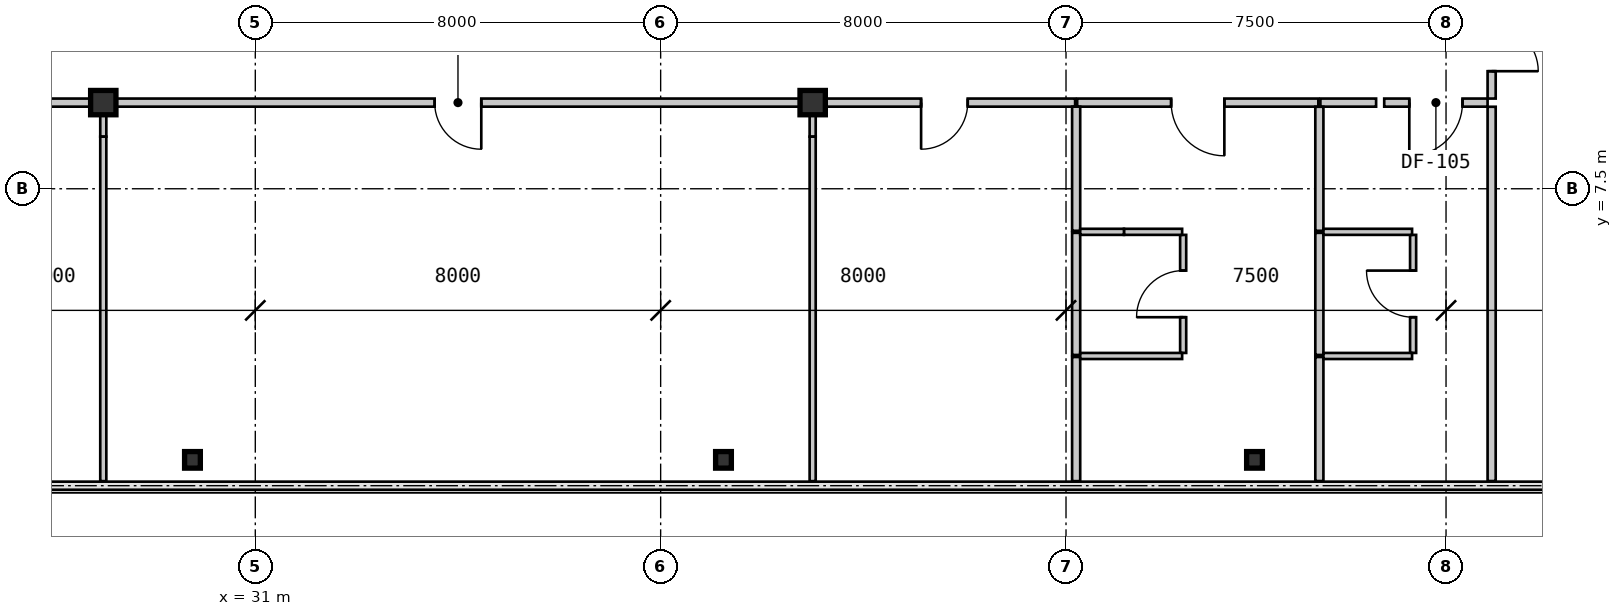
"""IFC4 building model, lengths in metres.
Left out: names, types, materials, properties, quantities, classifications, styles, units other than length and angle.
Written with IfcOpenShell. Run it as: python <this file> out.ifc"""

import sys

from ifc_helpers import new_model, si_unit, direction, frame, frame_2d, origin, origin_2d, place, context, subcontext, project, spatial, rectangle, i_section, extrude, source, transform, mapped, element, fill, save


model = new_model("IFC4")
c1 = context("Model", 3, precision=1e-05, world=origin(), true_north=direction((0.0, 1.0)))
c2 = subcontext(c1, "Body", "Model", "MODEL_VIEW")
j1 = project(units=[si_unit("LENGTHUNIT", "METRE"), si_unit("PLANEANGLEUNIT", "RADIAN")], contexts=[c1])
p1 = place(None, origin())
s1 = spatial("IfcSite", under=j1, at=p1, CompositionType="ELEMENT")
p2 = place(p1, origin())
s2 = spatial("IfcBuilding", under=s1, at=p2, CompositionType="ELEMENT")
p3 = place(p2, frame((0.0, 0.0, 26.25)))
s3 = spatial("IfcBuildingStorey", under=s2, at=p3, CompositionType="ELEMENT", Elevation=26.25)
m1 = source(origin(), c2, "Body", "SweptSolid", [
    extrude(i_section(OverallWidth=0.5, OverallDepth=0.48, WebThickness=0.028, FlangeThickness=0.044, at=origin_2d()), origin(), (0.0, 0.0, 1.0), 3.15),
])
for number, where, z_axis, x_axis in (
    (1, (28.0, 9.2, 0.0), (0.0, 0.0, 1.0), (1.0, 0.0, 0.0)),
    (2, (42.0, 9.2, 0.0), (0.0, 0.0, 1.0), (1.0, 0.0, 0.0)),
):
    element("IfcColumn", number, at=place(p3, frame(where, z_axis=z_axis, x_axis=x_axis)), inside=s3, PredefinedType="COLUMN", context=c2, shape_type="MappedRepresentation", body=[
        mapped(m1, transform((0.0, 0.0, 0.0), scale=1.0)),
    ])
m2 = source(origin(), c2, "Body", "SweptSolid", [
    extrude(i_section(OverallWidth=0.311, OverallDepth=0.327, WebThickness=0.016, FlangeThickness=0.025, at=origin_2d()), origin(), (0.0, 0.0, 1.0), 3.15),
])
for number, where, z_axis, x_axis in (
    (3, (29.76, 2.15, 0.0), (0.0, 0.0, 1.0), (1.0, 0.0, 0.0)),
    (4, (40.24, 2.15, 0.0), (0.0, 0.0, 1.0), (1.0, 0.0, 0.0)),
    (5, (50.72, 2.15, 0.0), (0.0, 0.0, 1.0), (1.0, 0.0, 0.0)),
):
    element("IfcColumn", number, at=place(p3, frame(where, z_axis=z_axis, x_axis=x_axis)), inside=s3, PredefinedType="COLUMN", context=c2, shape_type="MappedRepresentation", body=[
        mapped(m2, transform((0.0, 0.0, 0.0), scale=1.0)),
    ])
m3 = source(origin(), c2, "Body", "SweptSolid", [
    extrude(rectangle(XDim=2.04, YDim=0.16, at=frame_2d((1.02, 0.0))), origin(), (0.0, 0.0, 1.0), 2.93),
])
p4 = place(p3, frame((55.32, 9.2, 0.0), z_axis=(0.0, 0.0, 1.0), x_axis=(-1.0, 0.0, 0.0)))
e6 = element("IfcWall", 6, at=p4, inside=s3, PredefinedType="PARTITIONING", context=c2, shape_type="MappedRepresentation", body=[
    mapped(m3, transform((0.0, 0.0, 0.0), scale=1.0)),
])
m4 = source(origin(), c2, "Body", "SweptSolid", [
    extrude(rectangle(XDim=1.05, YDim=2.1, at=frame_2d((0.525, 1.05))), frame((0.0, 0.09, 0.0), z_axis=(0.0, -1.0, 0.0), x_axis=(1.0, 0.0, 0.0)), (0.0, 0.0, 1.0), 0.18),
])
p5 = place(p4, frame((0.495, 0.0, 0.0)))
e7 = element("IfcOpeningElement", 7, at=p5, cuts=e6, PredefinedType="OPENING", context=c2, shape_type="MappedRepresentation", body=[
    mapped(m4, transform((0.0, 0.0, 0.0), scale=1.0)),
])
m5 = source(origin(), c2, "Body", "SweptSolid", [
    extrude(rectangle(XDim=2.0, YDim=0.16, at=frame_2d((1.0, 0.0))), origin(), (0.0, 0.0, 1.0), 2.93),
])
p6 = place(p3, frame((55.4, 11.28, 0.0), z_axis=(0.0, 0.0, 1.0), x_axis=(0.0, -1.0, 0.0)))
e8 = element("IfcWall", 8, at=p6, inside=s3, PredefinedType="PARTITIONING", context=c2, shape_type="MappedRepresentation", body=[
    mapped(m5, transform((0.0, 0.0, 0.0), scale=1.0)),
])
m6 = source(origin(), c2, "Body", "SweptSolid", [
    extrude(rectangle(XDim=0.92, YDim=2.1, at=frame_2d((0.46, 1.05))), frame((0.0, 0.09, 0.0), z_axis=(0.0, -1.0, 0.0), x_axis=(1.0, 0.0, 0.0)), (0.0, 0.0, 1.0), 0.18),
])
p7 = place(p6, frame((0.54, 0.0, 0.0)))
e9 = element("IfcOpeningElement", 9, at=p7, cuts=e8, PredefinedType="OPENING", context=c2, shape_type="MappedRepresentation", body=[
    mapped(m6, transform((0.0, 0.0, 0.0), scale=1.0)),
])
m7 = source(origin(), c2, "Body", "SweptSolid", [
    extrude(rectangle(XDim=9.959, YDim=0.16, at=frame_2d((4.98, 0.0))), origin(), (0.0, 0.0, 1.0), 2.93),
])
p8 = place(p3, frame((27.98, 9.2, 0.0), z_axis=(0.0, 0.0, 1.0), x_axis=(-1.0, 0.0, 0.0)))
e10 = element("IfcWall", 10, at=p8, inside=s3, PredefinedType="PARTITIONING", context=c2, shape_type="MappedRepresentation", body=[
    mapped(m7, transform((0.0, 0.0, 0.0), scale=1.0)),
])
p9 = place(p8, frame((4.52, 0.0, 0.0)))
e11 = element("IfcOpeningElement", 11, at=p9, cuts=e10, PredefinedType="OPENING", context=c2, shape_type="MappedRepresentation", body=[
    mapped(m6, transform((0.0, 0.0, 0.0), scale=1.0)),
])
m8 = source(origin(), c2, "Body", "SweptSolid", [
    extrude(rectangle(XDim=13.959, YDim=0.16, at=frame_2d((6.98, 0.0))), origin(), (0.0, 0.0, 1.0), 2.328),
])
p10 = place(p3, frame((41.98, 9.2, 0.0), z_axis=(0.0, 0.0, 1.0), x_axis=(-1.0, 0.0, 0.0)))
e12 = element("IfcWall", 12, at=p10, inside=s3, PredefinedType="PARTITIONING", context=c2, shape_type="MappedRepresentation", body=[
    mapped(m8, transform((0.0, 0.0, 0.0), scale=1.0)),
])
p11 = place(p10, frame((6.52, 0.0, 0.0)))
e13 = element("IfcOpeningElement", 13, at=p11, cuts=e12, PredefinedType="OPENING", context=c2, shape_type="MappedRepresentation", body=[
    mapped(m6, transform((0.0, 0.0, 0.0), scale=1.0)),
])
m9 = source(origin(), c2, "Body", "SweptSolid", [
    extrude(rectangle(XDim=5.159, YDim=0.16, at=frame_2d((2.58, 0.0))), origin(), (0.0, 0.0, 1.0), 2.93),
])
p12 = place(p3, frame((47.18, 9.2, 0.0), z_axis=(0.0, 0.0, 1.0), x_axis=(-1.0, 0.0, 0.0)))
e14 = element("IfcWall", 14, at=p12, inside=s3, PredefinedType="PARTITIONING", context=c2, shape_type="MappedRepresentation", body=[
    mapped(m9, transform((0.0, 0.0, 0.0), scale=1.0)),
])
p13 = place(p12, frame((2.12, 0.0, 0.0)))
e15 = element("IfcOpeningElement", 15, at=p13, cuts=e14, PredefinedType="OPENING", context=c2, shape_type="MappedRepresentation", body=[
    mapped(m6, transform((0.0, 0.0, 0.0), scale=1.0)),
])
m10 = source(origin(), c2, "Body", "SweptSolid", [
    extrude(rectangle(XDim=4.76, YDim=0.16, at=frame_2d((2.38, 0.0))), origin(), (0.0, 0.0, 1.0), 2.93),
])
p14 = place(p3, frame((51.98, 9.2, 0.0), z_axis=(0.0, 0.0, 1.0), x_axis=(-1.0, 0.0, 0.0)))
e16 = element("IfcWall", 16, at=p14, inside=s3, PredefinedType="PARTITIONING", context=c2, shape_type="MappedRepresentation", body=[
    mapped(m10, transform((0.0, 0.0, 0.0), scale=1.0)),
])
p15 = place(p14, frame((1.855, 0.0, 0.0)))
e17 = element("IfcOpeningElement", 17, at=p15, cuts=e16, PredefinedType="OPENING", context=c2, shape_type="MappedRepresentation", body=[
    mapped(m4, transform((0.0, 0.0, 0.0), scale=1.0)),
])
m11 = source(origin(), c2, "Body", "SweptSolid", [
    extrude(rectangle(XDim=1.1, YDim=0.16, at=frame_2d((0.55, 0.0))), origin(), (0.0, 0.0, 1.0), 2.93),
])
p16 = place(p3, frame((53.12, 9.2, 0.0), z_axis=(0.0, 0.0, 1.0), x_axis=(-1.0, 0.0, 0.0)))
e18 = element("IfcWall", 18, at=p16, inside=s3, PredefinedType="PARTITIONING", context=c2, shape_type="MappedRepresentation", body=[
    mapped(m11, transform((0.0, 0.0, 0.0), scale=1.0)),
])
m12 = source(origin(), c2, "Body", "SweptSolid", [
    extrude(rectangle(XDim=0.592, YDim=0.12, at=frame_2d((0.296, 0.0))), origin(), (0.0, 0.0, 1.0), 2.397),
])
p17 = place(p3, frame((28.0, 9.12, 0.0), z_axis=(0.0, 0.0, 1.0), x_axis=(0.0, -1.0, 0.0)))
e19 = element("IfcWall", 19, at=p17, inside=s3, PredefinedType="PARTITIONING", context=c2, shape_type="MappedRepresentation", body=[
    mapped(m12, transform((0.0, 0.0, 0.0), scale=1.0)),
])
m13 = source(origin(), c2, "Body", "SweptSolid", [
    extrude(rectangle(XDim=6.798, YDim=0.12, at=frame_2d((3.399, 0.0))), origin(), (0.0, 0.0, 1.0), 2.93),
])
p18 = place(p3, frame((28.0, 8.528, 0.0), z_axis=(0.0, 0.0, 1.0), x_axis=(0.0, -1.0, 0.0)))
e20 = element("IfcWall", 20, at=p18, inside=s3, PredefinedType="PARTITIONING", context=c2, shape_type="MappedRepresentation", body=[
    mapped(m13, transform((0.0, 0.0, 0.0), scale=1.0)),
])
p19 = place(p3, frame((42.0, 9.12, 0.0), z_axis=(0.0, 0.0, 1.0), x_axis=(0.0, -1.0, 0.0)))
e21 = element("IfcWall", 21, at=p19, inside=s3, PredefinedType="PARTITIONING", context=c2, shape_type="MappedRepresentation", body=[
    mapped(m12, transform((0.0, 0.0, 0.0), scale=1.0)),
])
p20 = place(p3, frame((42.0, 8.528, 0.0), z_axis=(0.0, 0.0, 1.0), x_axis=(0.0, -1.0, 0.0)))
e22 = element("IfcWall", 22, at=p20, inside=s3, PredefinedType="PARTITIONING", context=c2, shape_type="MappedRepresentation", body=[
    mapped(m13, transform((0.0, 0.0, 0.0), scale=1.0)),
])
m14 = source(origin(), c2, "Body", "SweptSolid", [
    extrude(rectangle(XDim=2.45, YDim=0.16, at=frame_2d((1.225, 0.0))), origin(), (0.0, 0.0, 1.0), 2.93),
])
p21 = place(p3, frame((47.2, 4.18, 0.0), z_axis=(0.0, 0.0, 1.0), x_axis=(0.0, -1.0, 0.0)))
e23 = element("IfcWall", 23, at=p21, inside=s3, PredefinedType="PARTITIONING", context=c2, shape_type="MappedRepresentation", body=[
    mapped(m14, transform((0.0, 0.0, 0.0), scale=1.0)),
])
m15 = source(origin(), c2, "Body", "SweptSolid", [
    extrude(rectangle(XDim=2.45, YDim=0.16, at=frame_2d((1.225, 0.0))), origin(), (0.0, 0.0, 1.0), 2.93),
])
p22 = place(p3, frame((47.2, 9.12, 0.0), z_axis=(0.0, 0.0, 1.0), x_axis=(0.0, -1.0, 0.0)))
e24 = element("IfcWall", 24, at=p22, inside=s3, PredefinedType="PARTITIONING", context=c2, shape_type="MappedRepresentation", body=[
    mapped(m15, transform((0.0, 0.0, 0.0), scale=1.0)),
])
m16 = source(origin(), c2, "Body", "SweptSolid", [
    extrude(rectangle(XDim=2.41, YDim=0.16, at=frame_2d((1.205, 0.0))), origin(), (0.0, 0.0, 1.0), 2.93),
])
p23 = place(p3, frame((47.2, 6.63, 0.0), z_axis=(0.0, 0.0, 1.0), x_axis=(0.0, -1.0, 0.0)))
e25 = element("IfcWall", 25, at=p23, inside=s3, PredefinedType="PARTITIONING", context=c2, shape_type="MappedRepresentation", body=[
    mapped(m16, transform((0.0, 0.0, 0.0), scale=1.0)),
])
m17 = source(origin(), c2, "Body", "SweptSolid", [
    extrude(rectangle(XDim=2.33, YDim=0.12, at=frame_2d((1.165, 0.0))), origin(), (0.0, 0.0, 1.0), 2.93),
])
p24 = place(p3, frame((49.312, 4.26, 0.0), z_axis=(0.0, 0.0, 1.0), x_axis=(0.0, 1.0, 0.0)))
e26 = element("IfcWall", 26, at=p24, inside=s3, PredefinedType="PARTITIONING", context=c2, shape_type="MappedRepresentation", body=[
    mapped(m17, transform((0.0, 0.0, 0.0), scale=1.0)),
])
m18 = source(origin(), c2, "Body", "SweptSolid", [
    extrude(rectangle(XDim=0.92, YDim=2.1, at=frame_2d((0.46, 1.05))), frame((0.0, 0.07, 0.0), z_axis=(0.0, -1.0, 0.0), x_axis=(1.0, 0.0, 0.0)), (0.0, 0.0, 1.0), 0.14),
])
p25 = place(p24, frame((0.705, 0.0, 0.0)))
e27 = element("IfcOpeningElement", 27, at=p25, cuts=e26, PredefinedType="OPENING", context=c2, shape_type="MappedRepresentation", body=[
    mapped(m18, transform((0.0, 0.0, 0.0), scale=1.0)),
])
m19 = source(origin(), c2, "Body", "SweptSolid", [
    extrude(rectangle(XDim=2.012, YDim=0.12, at=frame_2d((1.006, 0.0))), origin(), (0.0, 0.0, 1.0), 2.93),
])
p26 = place(p3, frame((47.28, 4.2, 0.0), z_axis=(0.0, 0.0, 1.0), x_axis=(1.0, 0.0, 0.0)))
e28 = element("IfcWall", 28, at=p26, inside=s3, PredefinedType="PARTITIONING", context=c2, shape_type="MappedRepresentation", body=[
    mapped(m19, transform((0.0, 0.0, 0.0), scale=1.0)),
])
m20 = source(origin(), c2, "Body", "SweptSolid", [
    extrude(rectangle(XDim=1.148, YDim=0.12, at=frame_2d((0.574, 0.0))), origin(), (0.0, 0.0, 1.0), 2.93),
])
p27 = place(p3, frame((49.292, 6.65, 0.0), z_axis=(0.0, 0.0, 1.0), x_axis=(-1.0, 0.0, 0.0)))
e29 = element("IfcWall", 29, at=p27, inside=s3, PredefinedType="PARTITIONING", context=c2, shape_type="MappedRepresentation", body=[
    mapped(m20, transform((0.0, 0.0, 0.0), scale=1.0)),
])
m21 = source(origin(), c2, "Body", "SweptSolid", [
    extrude(rectangle(XDim=0.864, YDim=0.12, at=frame_2d((0.432, 0.0))), origin(), (0.0, 0.0, 1.0), 2.47),
])
p28 = place(p3, frame((48.144, 6.65, 0.0), z_axis=(0.0, 0.0, 1.0), x_axis=(-1.0, 0.0, 0.0)))
e30 = element("IfcWall", 30, at=p28, inside=s3, PredefinedType="PARTITIONING", context=c2, shape_type="MappedRepresentation", body=[
    mapped(m21, transform((0.0, 0.0, 0.0), scale=1.0)),
])
m22 = source(origin(), c2, "Body", "SweptSolid", [
    extrude(rectangle(XDim=2.448, YDim=0.16, at=frame_2d((1.224, 0.0))), origin(), (0.0, 0.0, 1.0), 2.93),
])
for number, where, z_axis, x_axis in (
    (31, (52.0, 4.18, 0.0), (0.0, 0.0, 1.0), (0.0, -1.0, 0.0)),
    (32, (52.0, 9.118, 0.0), (0.0, 0.0, 1.0), (0.0, -1.0, 0.0)),
):
    element("IfcWall", number, at=place(p3, frame(where, z_axis=z_axis, x_axis=x_axis)), inside=s3, PredefinedType="PARTITIONING", context=c2, shape_type="MappedRepresentation", body=[
        mapped(m22, transform((0.0, 0.0, 0.0), scale=1.0)),
    ])
p29 = place(p3, frame((52.0, 6.63, 0.0), z_axis=(0.0, 0.0, 1.0), x_axis=(0.0, -1.0, 0.0)))
e33 = element("IfcWall", 33, at=p29, inside=s3, PredefinedType="PARTITIONING", context=c2, shape_type="MappedRepresentation", body=[
    mapped(m16, transform((0.0, 0.0, 0.0), scale=1.0)),
])
p30 = place(p3, frame((53.85, 4.26, 0.0), z_axis=(0.0, 0.0, 1.0), x_axis=(0.0, 1.0, 0.0)))
e34 = element("IfcWall", 34, at=p30, inside=s3, PredefinedType="PARTITIONING", context=c2, shape_type="MappedRepresentation", body=[
    mapped(m17, transform((0.0, 0.0, 0.0), scale=1.0)),
])
p31 = place(p30, frame((0.705, 0.0, 0.0)))
e35 = element("IfcOpeningElement", 35, at=p31, cuts=e34, PredefinedType="OPENING", context=c2, shape_type="MappedRepresentation", body=[
    mapped(m18, transform((0.0, 0.0, 0.0), scale=1.0)),
])
m23 = source(origin(), c2, "Body", "SweptSolid", [
    extrude(rectangle(XDim=1.75, YDim=0.12, at=frame_2d((0.875, 0.0))), origin(), (0.0, 0.0, 1.0), 2.93),
])
for number, where, z_axis, x_axis in (
    (36, (52.08, 4.2, 0.0), (0.0, 0.0, 1.0), (1.0, 0.0, 0.0)),
    (37, (53.83, 6.65, 0.0), (0.0, 0.0, 1.0), (-1.0, 0.0, 0.0)),
):
    element("IfcWall", number, at=place(p3, frame(where, z_axis=z_axis, x_axis=x_axis)), inside=s3, PredefinedType="PARTITIONING", context=c2, shape_type="MappedRepresentation", body=[
        mapped(m23, transform((0.0, 0.0, 0.0), scale=1.0)),
    ])
m24 = source(origin(), c2, "Body", "SweptSolid", [
    extrude(rectangle(XDim=7.386, YDim=0.16, at=frame_2d((3.693, 0.0))), origin(), (0.0, 0.0, 1.0), 2.93),
])
p32 = place(p3, frame((55.4, 9.118, 0.0), z_axis=(0.0, 0.0, 1.0), x_axis=(0.0, -1.0, 0.0)))
e38 = element("IfcWall", 38, at=p32, inside=s3, PredefinedType="PARTITIONING", context=c2, shape_type="MappedRepresentation", body=[
    mapped(m24, transform((0.0, 0.0, 0.0), scale=1.0)),
])
m25 = source(origin(), c2, "Body", "SweptSolid", [
    extrude(rectangle(XDim=1.05, YDim=2.1, at=frame_2d((0.525, 1.05))), frame((0.0, 0.025, 0.0), z_axis=(0.0, -1.0, 0.0), x_axis=(1.0, 0.0, 0.0)), (0.0, 0.0, 1.0), 0.05),
])
p33 = place(p5, origin())
e39 = element("IfcDoor", 39, at=p33, inside=s3, OperationType="SINGLE_SWING_RIGHT", PredefinedType="DOOR", context=c2, shape_type="MappedRepresentation", body=[
    mapped(m25, transform((0.0, 0.0, 0.0), scale=1.0)),
])
fill(e7, e39)
m26 = source(origin(), c2, "Body", "SweptSolid", [
    extrude(rectangle(XDim=0.92, YDim=2.1, at=frame_2d((0.46, 1.05))), frame((0.0, 0.025, 0.0), z_axis=(0.0, -1.0, 0.0), x_axis=(1.0, 0.0, 0.0)), (0.0, 0.0, 1.0), 0.05),
])
p34 = place(p7, origin())
e40 = element("IfcDoor", 40, at=p34, inside=s3, OperationType="SINGLE_SWING_RIGHT", PredefinedType="DOOR", context=c2, shape_type="MappedRepresentation", body=[
    mapped(m26, transform((0.0, 0.0, 0.0), scale=1.0)),
])
fill(e9, e40)
p35 = place(p11, origin())
e41 = element("IfcDoor", 41, at=p35, inside=s3, OperationType="SINGLE_SWING_LEFT", PredefinedType="DOOR", context=c2, shape_type="MappedRepresentation", body=[
    mapped(m26, transform((0.0, 0.0, 0.0), scale=1.0)),
])
fill(e13, e41)
p36 = place(p13, origin())
e42 = element("IfcDoor", 42, at=p36, inside=s3, OperationType="SINGLE_SWING_RIGHT", PredefinedType="DOOR", context=c2, shape_type="MappedRepresentation", body=[
    mapped(m26, transform((0.0, 0.0, 0.0), scale=1.0)),
])
fill(e15, e42)
p37 = place(p15, origin())
e43 = element("IfcDoor", 43, at=p37, inside=s3, OperationType="SINGLE_SWING_LEFT", PredefinedType="DOOR", context=c2, shape_type="MappedRepresentation", body=[
    mapped(m25, transform((0.0, 0.0, 0.0), scale=1.0)),
])
fill(e17, e43)
p38 = place(p25, origin())
e44 = element("IfcDoor", 44, at=p38, inside=s3, OperationType="SINGLE_SWING_LEFT", PredefinedType="DOOR", context=c2, shape_type="MappedRepresentation", body=[
    mapped(m26, transform((0.0, 0.0, 0.0), scale=1.0)),
])
fill(e27, e44)
p39 = place(p31, origin())
e45 = element("IfcDoor", 45, at=p39, inside=s3, OperationType="SINGLE_SWING_RIGHT", PredefinedType="DOOR", context=c2, shape_type="MappedRepresentation", body=[
    mapped(m26, transform((0.0, 0.0, 0.0), scale=1.0)),
])
fill(e35, e45)
save(model, sys.argv[1])
